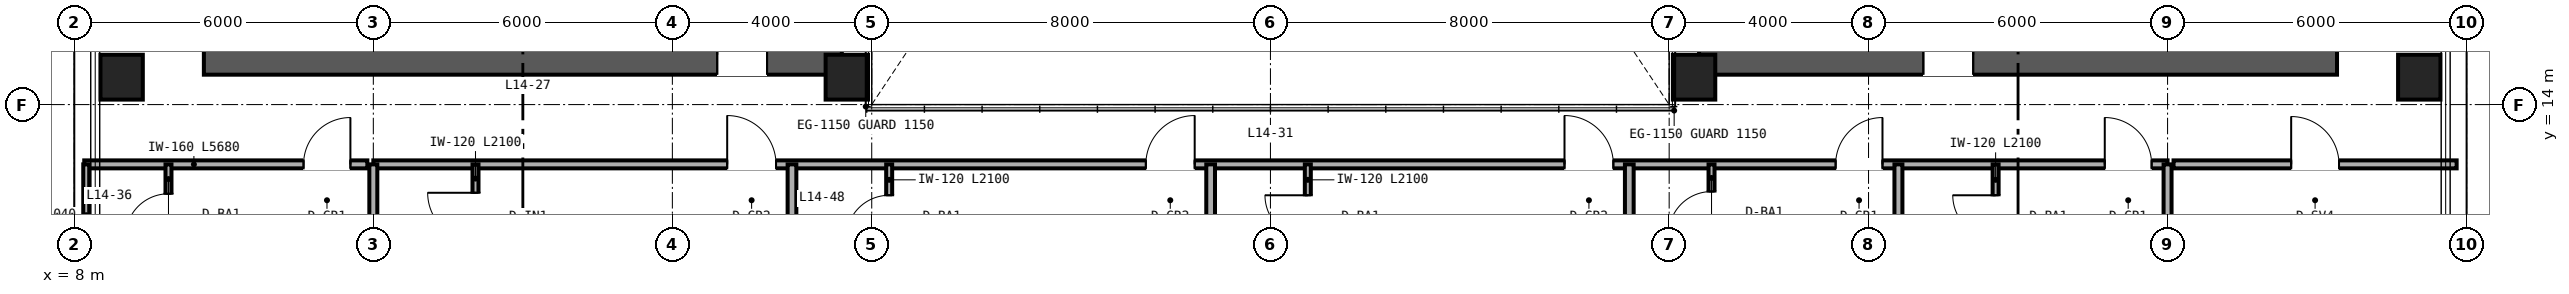
"""IFC4 building model, lengths in metres.
Left out: names, types, materials, properties, quantities, classifications, styles, units other than length and angle.
Written with IfcOpenShell. Run it as: python <this file> out.ifc"""

import sys

from ifc_helpers import new_model, si_unit, direction, frame, frame_2d, origin, origin_2d, place, context, subcontext, project, spatial, rectangle, hollow_rectangle, extrude, source, transform, mapped, element, fill, save


model = new_model("IFC4")
c1 = context("Model", 3, precision=1e-05, world=origin(), true_north=direction((0.0, 1.0)))
c2 = subcontext(c1, "Body", "Model", "MODEL_VIEW")
j1 = project(units=[si_unit("LENGTHUNIT", "METRE"), si_unit("PLANEANGLEUNIT", "RADIAN")], contexts=[c1])
p1 = place(None, origin())
s1 = spatial("IfcSite", under=j1, at=p1, CompositionType="ELEMENT")
p2 = place(p1, origin())
s2 = spatial("IfcBuilding", under=s1, at=p2, CompositionType="ELEMENT")
p3 = place(p2, frame((0.0, 0.0, 60.0)))
s3 = spatial("IfcBuildingStorey", under=s2, at=p3, CompositionType="ELEMENT", Elevation=60.0)
p4 = place(p3, frame((10.6, 15.0, 0.0), z_axis=(0.0, 0.0, 1.0), x_axis=(1.0, 0.0, 0.0)))
e1 = element("IfcWall", 1, at=p4, inside=s3, PredefinedType="SHEAR", context=c2, shape_type="SweptSolid", body=[
    extrude(rectangle(XDim=12.8, YDim=0.8, at=frame_2d((6.4, 0.0))), origin(), (0.0, 0.0, 1.0), 3.35),
])
p5 = place(p4, frame((10.3, 0.0, 0.0)))
e2 = element("IfcOpeningElement", 2, at=p5, cuts=e1, PredefinedType="OPENING", context=c2, shape_type="SweptSolid", body=[
    extrude(rectangle(XDim=1.0, YDim=2.15, at=frame_2d((0.5, 1.075))), frame((0.0, 0.41, 0.0), z_axis=(0.0, -1.0, 0.0), x_axis=(1.0, 0.0, 0.0)), (0.0, 0.0, 1.0), 0.82),
])
p6 = place(p3, frame((40.6, 15.0, 0.0), z_axis=(0.0, 0.0, 1.0), x_axis=(1.0, 0.0, 0.0)))
e3 = element("IfcWall", 3, at=p6, inside=s3, PredefinedType="SHEAR", context=c2, shape_type="SweptSolid", body=[
    extrude(rectangle(XDim=12.8, YDim=0.8, at=frame_2d((6.4, 0.0))), origin(), (0.0, 0.0, 1.0), 3.35),
])
p7 = place(p6, frame((4.5, 0.0, 0.0)))
e4 = element("IfcOpeningElement", 4, at=p7, cuts=e3, PredefinedType="OPENING", context=c2, shape_type="SweptSolid", body=[
    extrude(rectangle(XDim=1.0, YDim=2.15, at=frame_2d((0.5, 1.075))), frame((0.0, 0.41, 0.0), z_axis=(0.0, -1.0, 0.0), x_axis=(1.0, 0.0, 0.0)), (0.0, 0.0, 1.0), 0.82),
])
m1 = source(origin(), c2, "Body", "SweptSolid", [
    extrude(hollow_rectangle(XDim=0.85, YDim=0.9, WallThickness=0.04, at=origin_2d()), origin(), (0.0, 0.0, 1.0), 3.35),
])
for number, where, z_axis, x_axis in (
    (5, (8.95, 14.55, 0.0), (0.0, 0.0, 1.0), (1.0, 0.0, 0.0)),
    (6, (23.5, 14.55, 0.0), (0.0, 0.0, 1.0), (1.0, 0.0, 0.0)),
    (7, (40.5, 14.55, 0.0), (0.0, 0.0, 1.0), (1.0, 0.0, 0.0)),
    (8, (55.05, 14.55, 0.0), (0.0, 0.0, 1.0), (1.0, 0.0, 0.0)),
):
    element("IfcColumn", number, at=place(p3, frame(where, z_axis=z_axis, x_axis=x_axis)), inside=s3, PredefinedType="COLUMN", context=c2, shape_type="MappedRepresentation", body=[
        mapped(m1, transform((0.0, 0.0, 0.0), scale=1.0)),
    ])
p8 = place(p3, frame((8.2, 12.8, 0.0), z_axis=(0.0, 0.0, 1.0), x_axis=(1.0, 0.0, 0.0)))
e9 = element("IfcWall", 9, at=p8, inside=s3, PredefinedType="PARTITIONING", context=c2, shape_type="SweptSolid", body=[
    extrude(rectangle(XDim=5.68, YDim=0.16, at=frame_2d((2.84, 0.0))), origin(), (0.0, 0.0, 1.0), 3.35),
])
p9 = place(p8, frame((4.4, 0.0, 0.0)))
e10 = element("IfcOpeningElement", 10, at=p9, cuts=e9, PredefinedType="OPENING", context=c2, shape_type="SweptSolid", body=[
    extrude(rectangle(XDim=0.94, YDim=2.15, at=frame_2d((0.47, 1.075))), frame((0.0, 0.09, 0.0), z_axis=(0.0, -1.0, 0.0), x_axis=(1.0, 0.0, 0.0)), (0.0, 0.0, 1.0), 0.18),
])
p10 = place(p3, frame((9.89, 10.76, 0.0), z_axis=(0.0, 0.0, 1.0), x_axis=(0.0, 1.0, 0.0)))
e11 = element("IfcWall", 11, at=p10, inside=s3, PredefinedType="PARTITIONING", context=c2, shape_type="SweptSolid", body=[
    extrude(rectangle(XDim=2.04, YDim=0.12, at=frame_2d((1.02, 0.0))), origin(), (0.0, 0.0, 1.0), 3.35),
])
p11 = place(p10, frame((0.59, 0.0, 0.0)))
e12 = element("IfcOpeningElement", 12, at=p11, cuts=e11, PredefinedType="OPENING", context=c2, shape_type="SweptSolid", body=[
    extrude(rectangle(XDim=0.86, YDim=2.1, at=frame_2d((0.43, 1.05))), frame((0.0, 0.07, 0.0), z_axis=(0.0, -1.0, 0.0), x_axis=(1.0, 0.0, 0.0)), (0.0, 0.0, 1.0), 0.14),
])
p12 = place(p3, frame((8.24, 10.76, 0.0), z_axis=(0.0, 0.0, 1.0), x_axis=(0.0, 1.0, 0.0)))
e13 = element("IfcWall", 13, at=p12, inside=s3, PredefinedType="PARTITIONING", context=c2, shape_type="SweptSolid", body=[
    extrude(rectangle(XDim=2.04, YDim=0.12, at=frame_2d((1.02, 0.0))), origin(), (0.0, 0.0, 1.0), 3.35),
])
p13 = place(p3, frame((50.12, 12.8, 0.0), z_axis=(0.0, 0.0, 1.0), x_axis=(1.0, 0.0, 0.0)))
e14 = element("IfcWall", 14, at=p13, inside=s3, PredefinedType="PARTITIONING", context=c2, shape_type="SweptSolid", body=[
    extrude(rectangle(XDim=5.68, YDim=0.16, at=frame_2d((2.84, 0.0))), origin(), (0.0, 0.0, 1.0), 3.35),
])
p14 = place(p13, frame((2.36, 0.0, 0.0)))
e15 = element("IfcOpeningElement", 15, at=p14, cuts=e14, PredefinedType="OPENING", context=c2, shape_type="SweptSolid", body=[
    extrude(rectangle(XDim=0.96, YDim=2.15, at=frame_2d((0.48, 1.075))), frame((0.0, 0.09, 0.0), z_axis=(0.0, -1.0, 0.0), x_axis=(1.0, 0.0, 0.0)), (0.0, 0.0, 1.0), 0.18),
])
p15 = place(p3, frame((14.0, 12.8, 0.0), z_axis=(0.0, 0.0, 1.0), x_axis=(1.0, 0.0, 0.0)))
e16 = element("IfcWall", 16, at=p15, inside=s3, PredefinedType="PARTITIONING", context=c2, shape_type="SweptSolid", body=[
    extrude(rectangle(XDim=36.0, YDim=0.16, at=frame_2d((18.0, 0.0))), origin(), (0.0, 0.0, 1.0), 2.571),
])
p16 = place(p15, frame((7.1, 0.0, 0.0)))
e17 = element("IfcOpeningElement", 17, at=p16, cuts=e16, PredefinedType="OPENING", context=c2, shape_type="SweptSolid", body=[
    extrude(rectangle(XDim=0.98, YDim=2.2, at=frame_2d((0.49, 1.1))), frame((0.0, 0.09, 0.0), z_axis=(0.0, -1.0, 0.0), x_axis=(1.0, 0.0, 0.0)), (0.0, 0.0, 1.0), 0.18),
])
p17 = place(p15, frame((15.5, 0.0, 0.0)))
e18 = element("IfcOpeningElement", 18, at=p17, cuts=e16, PredefinedType="OPENING", context=c2, shape_type="SweptSolid", body=[
    extrude(rectangle(XDim=0.98, YDim=2.2, at=frame_2d((0.49, 1.1))), frame((0.0, 0.09, 0.0), z_axis=(0.0, -1.0, 0.0), x_axis=(1.0, 0.0, 0.0)), (0.0, 0.0, 1.0), 0.18),
])
p18 = place(p15, frame((23.9, 0.0, 0.0)))
e19 = element("IfcOpeningElement", 19, at=p18, cuts=e16, PredefinedType="OPENING", context=c2, shape_type="SweptSolid", body=[
    extrude(rectangle(XDim=0.98, YDim=2.2, at=frame_2d((0.49, 1.1))), frame((0.0, 0.09, 0.0), z_axis=(0.0, -1.0, 0.0), x_axis=(1.0, 0.0, 0.0)), (0.0, 0.0, 1.0), 0.18),
])
p19 = place(p15, frame((29.34, 0.0, 0.0)))
e20 = element("IfcOpeningElement", 20, at=p19, cuts=e16, PredefinedType="OPENING", context=c2, shape_type="SweptSolid", body=[
    extrude(rectangle(XDim=0.94, YDim=2.15, at=frame_2d((0.47, 1.075))), frame((0.0, 0.09, 0.0), z_axis=(0.0, -1.0, 0.0), x_axis=(1.0, 0.0, 0.0)), (0.0, 0.0, 1.0), 0.18),
])
p20 = place(p15, frame((34.74, 0.0, 0.0)))
e21 = element("IfcOpeningElement", 21, at=p20, cuts=e16, PredefinedType="OPENING", context=c2, shape_type="SweptSolid", body=[
    extrude(rectangle(XDim=0.94, YDim=2.15, at=frame_2d((0.47, 1.075))), frame((0.0, 0.09, 0.0), z_axis=(0.0, -1.0, 0.0), x_axis=(1.0, 0.0, 0.0)), (0.0, 0.0, 1.0), 0.18),
])
for number, where, z_axis, x_axis in (
    (22, (14.0, 2.36, 0.0), (0.0, 0.0, 1.0), (0.0, 1.0, 0.0)),
    (23, (50.0, 2.36, 0.0), (0.0, 0.0, 1.0), (0.0, 1.0, 0.0)),
):
    element("IfcWall", number, at=place(p3, frame(where, z_axis=z_axis, x_axis=x_axis)), inside=s3, PredefinedType="PARTITIONING", context=c2, shape_type="SweptSolid", body=[
        extrude(rectangle(XDim=10.44, YDim=0.16, at=frame_2d((5.22, 0.0))), origin(), (0.0, 0.0, 1.0), 2.657),
    ])
p21 = place(p3, frame((22.4, 2.36, 0.0), z_axis=(0.0, 0.0, 1.0), x_axis=(0.0, 1.0, 0.0)))
e24 = element("IfcWall", 24, at=p21, inside=s3, PredefinedType="PARTITIONING", context=c2, shape_type="SweptSolid", body=[
    extrude(rectangle(XDim=10.44, YDim=0.175, at=frame_2d((5.22, 0.0))), origin(), (0.0, 0.0, 1.0), 2.813),
])
p22 = place(p3, frame((16.05, 10.7, 0.0), z_axis=(0.0, 0.0, 1.0), x_axis=(0.0, 1.0, 0.0)))
e25 = element("IfcWall", 25, at=p22, inside=s3, PredefinedType="PARTITIONING", context=c2, shape_type="SweptSolid", body=[
    extrude(rectangle(XDim=2.1, YDim=0.12, at=frame_2d((1.05, 0.0))), origin(), (0.0, 0.0, 1.0), 3.35),
])
p23 = place(p22, frame((0.57, 0.0, 0.0)))
e26 = element("IfcOpeningElement", 26, at=p23, cuts=e25, PredefinedType="OPENING", context=c2, shape_type="SweptSolid", body=[
    extrude(rectangle(XDim=0.96, YDim=2.15, at=frame_2d((0.48, 1.075))), frame((0.0, 0.07, 0.0), z_axis=(0.0, -1.0, 0.0), x_axis=(1.0, 0.0, 0.0)), (0.0, 0.0, 1.0), 0.14),
])
p24 = place(p3, frame((30.8, 2.36, 0.0), z_axis=(0.0, 0.0, 1.0), x_axis=(0.0, 1.0, 0.0)))
e27 = element("IfcWall", 27, at=p24, inside=s3, PredefinedType="PARTITIONING", context=c2, shape_type="SweptSolid", body=[
    extrude(rectangle(XDim=10.44, YDim=0.175, at=frame_2d((5.22, 0.0))), origin(), (0.0, 0.0, 1.0), 2.423),
])
p25 = place(p3, frame((24.35, 10.7, 0.0), z_axis=(0.0, 0.0, 1.0), x_axis=(0.0, 1.0, 0.0)))
e28 = element("IfcWall", 28, at=p25, inside=s3, PredefinedType="PARTITIONING", context=c2, shape_type="SweptSolid", body=[
    extrude(rectangle(XDim=2.1, YDim=0.12, at=frame_2d((1.05, 0.0))), origin(), (0.0, 0.0, 1.0), 3.35),
])
p26 = place(p25, frame((0.62, 0.0, 0.0)))
e29 = element("IfcOpeningElement", 29, at=p26, cuts=e28, PredefinedType="OPENING", context=c2, shape_type="SweptSolid", body=[
    extrude(rectangle(XDim=0.86, YDim=2.1, at=frame_2d((0.43, 1.05))), frame((0.0, 0.07, 0.0), z_axis=(0.0, -1.0, 0.0), x_axis=(1.0, 0.0, 0.0)), (0.0, 0.0, 1.0), 0.14),
])
p27 = place(p3, frame((39.2, 2.36, 0.0), z_axis=(0.0, 0.0, 1.0), x_axis=(0.0, 1.0, 0.0)))
e30 = element("IfcWall", 30, at=p27, inside=s3, PredefinedType="PARTITIONING", context=c2, shape_type="SweptSolid", body=[
    extrude(rectangle(XDim=10.44, YDim=0.175, at=frame_2d((5.22, 0.0))), origin(), (0.0, 0.0, 1.0), 2.423),
])
p28 = place(p3, frame((32.75, 10.7, 0.0), z_axis=(0.0, 0.0, 1.0), x_axis=(0.0, 1.0, 0.0)))
e31 = element("IfcWall", 31, at=p28, inside=s3, PredefinedType="PARTITIONING", context=c2, shape_type="SweptSolid", body=[
    extrude(rectangle(XDim=2.1, YDim=0.12, at=frame_2d((1.05, 0.0))), origin(), (0.0, 0.0, 1.0), 3.35),
])
p29 = place(p28, frame((0.62, 0.0, 0.0)))
e32 = element("IfcOpeningElement", 32, at=p29, cuts=e31, PredefinedType="OPENING", context=c2, shape_type="SweptSolid", body=[
    extrude(rectangle(XDim=0.86, YDim=2.1, at=frame_2d((0.43, 1.05))), frame((0.0, 0.07, 0.0), z_axis=(0.0, -1.0, 0.0), x_axis=(1.0, 0.0, 0.0)), (0.0, 0.0, 1.0), 0.14),
])
p30 = place(p3, frame((44.6, 2.36, 0.0), z_axis=(0.0, 0.0, 1.0), x_axis=(0.0, 1.0, 0.0)))
e33 = element("IfcWall", 33, at=p30, inside=s3, PredefinedType="PARTITIONING", context=c2, shape_type="SweptSolid", body=[
    extrude(rectangle(XDim=10.44, YDim=0.16, at=frame_2d((5.22, 0.0))), origin(), (0.0, 0.0, 1.0), 2.657),
])
p31 = place(p3, frame((40.85, 10.85, 0.0), z_axis=(0.0, 0.0, 1.0), x_axis=(0.0, 1.0, 0.0)))
e34 = element("IfcWall", 34, at=p31, inside=s3, PredefinedType="PARTITIONING", context=c2, shape_type="SweptSolid", body=[
    extrude(rectangle(XDim=1.95, YDim=0.12, at=frame_2d((0.975, 0.0))), origin(), (0.0, 0.0, 1.0), 3.35),
])
p32 = place(p31, frame((0.545, 0.0, 0.0)))
e35 = element("IfcOpeningElement", 35, at=p32, cuts=e34, PredefinedType="OPENING", context=c2, shape_type="SweptSolid", body=[
    extrude(rectangle(XDim=0.86, YDim=2.1, at=frame_2d((0.43, 1.05))), frame((0.0, 0.07, 0.0), z_axis=(0.0, -1.0, 0.0), x_axis=(1.0, 0.0, 0.0)), (0.0, 0.0, 1.0), 0.14),
])
p33 = place(p3, frame((46.55, 10.7, 0.0), z_axis=(0.0, 0.0, 1.0), x_axis=(0.0, 1.0, 0.0)))
e36 = element("IfcWall", 36, at=p33, inside=s3, PredefinedType="PARTITIONING", context=c2, shape_type="SweptSolid", body=[
    extrude(rectangle(XDim=2.1, YDim=0.12, at=frame_2d((1.05, 0.0))), origin(), (0.0, 0.0, 1.0), 3.35),
])
p34 = place(p33, frame((0.62, 0.0, 0.0)))
e37 = element("IfcOpeningElement", 37, at=p34, cuts=e36, PredefinedType="OPENING", context=c2, shape_type="SweptSolid", body=[
    extrude(rectangle(XDim=0.86, YDim=2.1, at=frame_2d((0.43, 1.05))), frame((0.0, 0.07, 0.0), z_axis=(0.0, -1.0, 0.0), x_axis=(1.0, 0.0, 0.0)), (0.0, 0.0, 1.0), 0.14),
])
m2 = source(origin(), c2, "Body", "SweptSolid", [
    extrude(rectangle(XDim=1.0, YDim=2.15, at=frame_2d((0.5, 1.075))), frame((0.0, 0.025, 0.0), z_axis=(0.0, -1.0, 0.0), x_axis=(1.0, 0.0, 0.0)), (0.0, 0.0, 1.0), 0.05),
])
p35 = place(p5, origin())
e38 = element("IfcDoor", 38, at=p35, inside=s3, OperationType="SINGLE_SWING_LEFT", PredefinedType="DOOR", context=c2, shape_type="MappedRepresentation", body=[
    mapped(m2, transform((0.0, 0.0, 0.0), scale=1.0)),
])
fill(e2, e38)
p36 = place(p7, origin())
e39 = element("IfcDoor", 39, at=p36, inside=s3, OperationType="SINGLE_SWING_RIGHT", PredefinedType="DOOR", context=c2, shape_type="MappedRepresentation", body=[
    mapped(m2, transform((0.0, 0.0, 0.0), scale=1.0)),
])
fill(e4, e39)
m3 = source(origin(), c2, "Body", "SweptSolid", [
    extrude(rectangle(XDim=0.86, YDim=2.1, at=frame_2d((0.43, 1.05))), frame((0.0, 0.025, 0.0), z_axis=(0.0, -1.0, 0.0), x_axis=(1.0, 0.0, 0.0)), (0.0, 0.0, 1.0), 0.05),
])
p37 = place(p11, origin())
e40 = element("IfcDoor", 40, at=p37, inside=s3, OperationType="SINGLE_SWING_LEFT", PredefinedType="DOOR", context=c2, shape_type="MappedRepresentation", body=[
    mapped(m3, transform((0.0, 0.0, 0.0), scale=1.0)),
])
fill(e12, e40)
m4 = source(origin(), c2, "Body", "SweptSolid", [
    extrude(rectangle(XDim=0.94, YDim=2.15, at=frame_2d((0.47, 1.075))), frame((0.0, 0.025, 0.0), z_axis=(0.0, -1.0, 0.0), x_axis=(1.0, 0.0, 0.0)), (0.0, 0.0, 1.0), 0.05),
])
p38 = place(p9, origin())
e41 = element("IfcDoor", 41, at=p38, inside=s3, OperationType="SINGLE_SWING_RIGHT", PredefinedType="DOOR", context=c2, shape_type="MappedRepresentation", body=[
    mapped(m4, transform((0.0, 0.0, 0.0), scale=1.0)),
])
fill(e10, e41)
m5 = source(origin(), c2, "Body", "SweptSolid", [
    extrude(rectangle(XDim=0.96, YDim=2.15, at=frame_2d((0.48, 1.075))), frame((0.0, 0.025, 0.0), z_axis=(0.0, -1.0, 0.0), x_axis=(1.0, 0.0, 0.0)), (0.0, 0.0, 1.0), 0.05),
])
p39 = place(p14, origin())
e42 = element("IfcDoor", 42, at=p39, inside=s3, OperationType="SINGLE_SWING_LEFT", PredefinedType="DOOR", context=c2, shape_type="MappedRepresentation", body=[
    mapped(m5, transform((0.0, 0.0, 0.0), scale=1.0)),
])
fill(e15, e42)
p40 = place(p23, origin())
e43 = element("IfcDoor", 43, at=p40, inside=s3, OperationType="SINGLE_SWING_RIGHT", PredefinedType="DOOR", context=c2, shape_type="MappedRepresentation", body=[
    mapped(m5, transform((0.0, 0.0, 0.0), scale=1.0)),
])
fill(e26, e43)
p41 = place(p26, origin())
e44 = element("IfcDoor", 44, at=p41, inside=s3, OperationType="SINGLE_SWING_LEFT", PredefinedType="DOOR", context=c2, shape_type="MappedRepresentation", body=[
    mapped(m3, transform((0.0, 0.0, 0.0), scale=1.0)),
])
fill(e29, e44)
p42 = place(p29, origin())
e45 = element("IfcDoor", 45, at=p42, inside=s3, OperationType="SINGLE_SWING_RIGHT", PredefinedType="DOOR", context=c2, shape_type="MappedRepresentation", body=[
    mapped(m3, transform((0.0, 0.0, 0.0), scale=1.0)),
])
fill(e32, e45)
p43 = place(p32, origin())
e46 = element("IfcDoor", 46, at=p43, inside=s3, OperationType="SINGLE_SWING_LEFT", PredefinedType="DOOR", context=c2, shape_type="MappedRepresentation", body=[
    mapped(m3, transform((0.0, 0.0, 0.0), scale=1.0)),
])
fill(e35, e46)
p44 = place(p34, origin())
e47 = element("IfcDoor", 47, at=p44, inside=s3, OperationType="SINGLE_SWING_RIGHT", PredefinedType="DOOR", context=c2, shape_type="MappedRepresentation", body=[
    mapped(m3, transform((0.0, 0.0, 0.0), scale=1.0)),
])
fill(e37, e47)
m6 = source(origin(), c2, "Body", "SweptSolid", [
    extrude(rectangle(XDim=0.98, YDim=2.2, at=frame_2d((0.49, 1.1))), frame((0.0, 0.025, 0.0), z_axis=(0.0, -1.0, 0.0), x_axis=(1.0, 0.0, 0.0)), (0.0, 0.0, 1.0), 0.05),
])
p45 = place(p16, origin())
e48 = element("IfcDoor", 48, at=p45, inside=s3, OperationType="SINGLE_SWING_LEFT", PredefinedType="DOOR", context=c2, shape_type="MappedRepresentation", body=[
    mapped(m6, transform((0.0, 0.0, 0.0), scale=1.0)),
])
fill(e17, e48)
p46 = place(p17, origin())
e49 = element("IfcDoor", 49, at=p46, inside=s3, OperationType="SINGLE_SWING_RIGHT", PredefinedType="DOOR", context=c2, shape_type="MappedRepresentation", body=[
    mapped(m6, transform((0.0, 0.0, 0.0), scale=1.0)),
])
fill(e18, e49)
p47 = place(p18, origin())
e50 = element("IfcDoor", 50, at=p47, inside=s3, OperationType="SINGLE_SWING_LEFT", PredefinedType="DOOR", context=c2, shape_type="MappedRepresentation", body=[
    mapped(m6, transform((0.0, 0.0, 0.0), scale=1.0)),
])
fill(e19, e50)
p48 = place(p19, origin())
e51 = element("IfcDoor", 51, at=p48, inside=s3, OperationType="SINGLE_SWING_RIGHT", PredefinedType="DOOR", context=c2, shape_type="MappedRepresentation", body=[
    mapped(m4, transform((0.0, 0.0, 0.0), scale=1.0)),
])
fill(e20, e51)
p49 = place(p20, origin())
e52 = element("IfcDoor", 52, at=p49, inside=s3, OperationType="SINGLE_SWING_LEFT", PredefinedType="DOOR", context=c2, shape_type="MappedRepresentation", body=[
    mapped(m4, transform((0.0, 0.0, 0.0), scale=1.0)),
])
fill(e21, e52)
save(model, sys.argv[1])
